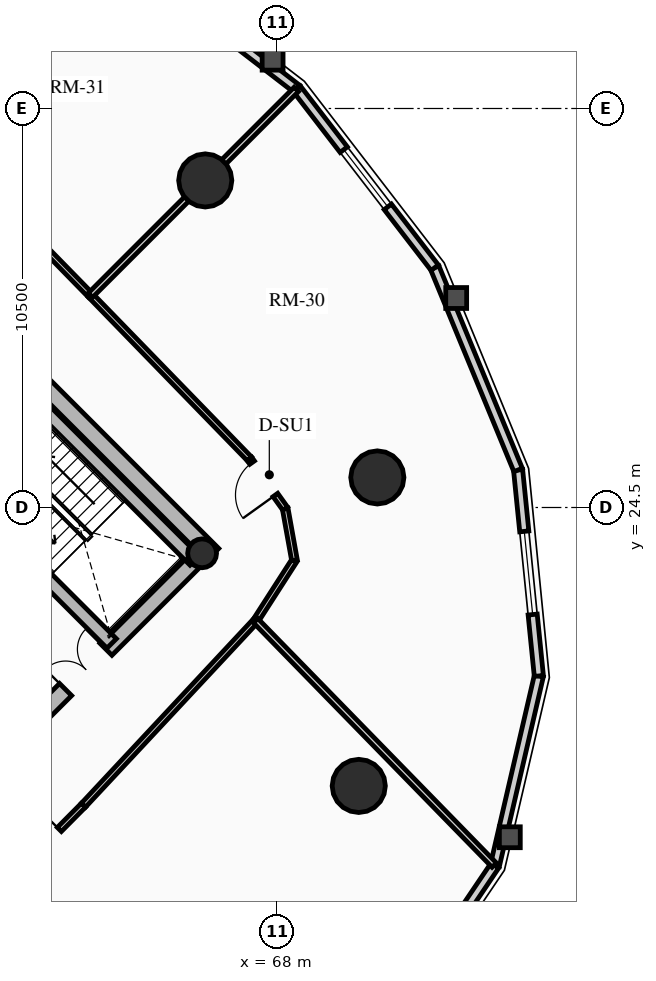
"""IFC4 building model, lengths in metres.
Left out: names, types, materials, properties, quantities, classifications, styles, units other than length and angle.
Written with IfcOpenShell. Run it as: python <this file> out.ifc"""

import sys

from ifc_helpers import new_model, si_unit, direction, frame, frame_2d, origin, origin_2d, place, context, subcontext, project, spatial, rectangle, circle, hollow_circle, extrude, source, transform, mapped, element, fill, save


model = new_model("IFC4")
c1 = context("Model", 3, precision=1e-05, world=origin(), true_north=direction((0.0, 1.0)))
c2 = subcontext(c1, "Body", "Model", "MODEL_VIEW")
j1 = project(units=[si_unit("LENGTHUNIT", "METRE"), si_unit("PLANEANGLEUNIT", "RADIAN")], contexts=[c1])
p1 = place(None, origin())
s1 = spatial("IfcSite", under=j1, at=p1, CompositionType="ELEMENT")
p2 = place(p1, origin())
s2 = spatial("IfcBuilding", under=s1, at=p2, CompositionType="ELEMENT")
p3 = place(p2, frame((0.0, 0.0, 125.44)))
s3 = spatial("IfcBuildingStorey", under=s2, at=p3, CompositionType="ELEMENT", Elevation=125.44)
p4 = place(p3, frame((66.303, 23.263, 0.0), z_axis=(0.0, 0.0, 1.0), x_axis=(-0.707106781187, 0.707106781187, 0.0)))
e1 = element("IfcWall", 1, at=p4, inside=s3, PredefinedType="SHEAR", context=c2, shape_type="SweptSolid", body=[
    extrude(rectangle(XDim=14.2, YDim=0.45, at=frame_2d((7.1, 0.0))), origin(), (0.0, 0.0, 1.0), 3.72),
])
p5 = place(p3, frame((58.578, 15.856, 0.0), z_axis=(0.0, 0.0, 1.0), x_axis=(0.707106781187, 0.707106781187, 0.0)))
e2 = element("IfcWall", 2, at=p5, inside=s3, PredefinedType="SHEAR", context=c2, shape_type="SweptSolid", body=[
    extrude(rectangle(XDim=10.7, YDim=0.45, at=frame_2d((5.35, 0.0))), origin(), (0.0, 0.0, 1.0), 3.72),
])
m1 = source(origin(), c2, "Body", "SweptSolid", [
    extrude(rectangle(XDim=1.5, YDim=2.02, at=frame_2d((0.75, 1.01))), frame((0.0, 0.235, 0.0), z_axis=(0.0, -1.0, 0.0), x_axis=(1.0, 0.0, 0.0)), (0.0, 0.0, 1.0), 0.47),
])
p6 = place(p5, frame((5.45, 0.0, 0.0)))
e3 = element("IfcOpeningElement", 3, at=p6, cuts=e2, PredefinedType="OPENING", context=c2, shape_type="MappedRepresentation", body=[
    mapped(m1, transform((0.0, 0.0, 0.0), x_axis=(1.0, 0.0, 0.0), y_axis=(0.0, 1.0, 0.0), z_axis=(0.0, 0.0, 1.0), scale=1.0)),
])
p7 = place(p3, frame((63.645, 20.922, 0.0), z_axis=(0.0, 0.0, 1.0), x_axis=(-0.707106781187, 0.707106781187, 0.0)))
e4 = element("IfcWall", 4, at=p7, inside=s3, PredefinedType="SHEAR", context=c2, shape_type="SweptSolid", body=[
    extrude(rectangle(XDim=13.75, YDim=0.35, at=frame_2d((6.875, 0.0))), origin(), (0.0, 0.0, 1.0), 3.72),
])
m2 = source(origin(), c2, "Body", "SweptSolid", [
    extrude(rectangle(XDim=1.1, YDim=2.015, at=frame_2d((0.55, 1.007))), frame((0.0, 0.185, 0.0), z_axis=(0.0, -1.0, 0.0), x_axis=(1.0, 0.0, 0.0)), (0.0, 0.0, 1.0), 0.37),
])
p8 = place(p7, frame((10.0, 0.0, 0.0)))
e5 = element("IfcOpeningElement", 5, at=p8, cuts=e4, PredefinedType="OPENING", context=c2, shape_type="MappedRepresentation", body=[
    mapped(m2, transform((0.0, 0.0, 0.0), x_axis=(1.0, 0.0, 0.0), y_axis=(0.0, 1.0, 0.0), z_axis=(0.0, 0.0, 1.0), scale=1.0)),
])
p9 = place(p7, frame((12.0, 0.0, 0.0)))
e6 = element("IfcOpeningElement", 6, at=p9, cuts=e4, PredefinedType="OPENING", context=c2, shape_type="MappedRepresentation", body=[
    mapped(m2, transform((0.0, 0.0, 0.0), x_axis=(1.0, 0.0, 0.0), y_axis=(0.0, 1.0, 0.0), z_axis=(0.0, 0.0, 1.0), scale=1.0)),
])
m3 = source(origin(), c2, "Body", "SweptSolid", [
    extrude(rectangle(XDim=1.15, YDim=2.02, at=frame_2d((0.575, 1.01))), frame((0.0, 0.185, 0.0), z_axis=(0.0, -1.0, 0.0), x_axis=(1.0, 0.0, 0.0)), (0.0, 0.0, 1.0), 0.37),
])
p10 = place(p7, frame((5.305, 0.0, 0.0)))
e7 = element("IfcOpeningElement", 7, at=p10, cuts=e4, PredefinedType="OPENING", context=c2, shape_type="MappedRepresentation", body=[
    mapped(m3, transform((0.0, 0.0, 0.0), x_axis=(1.0, 0.0, 0.0), y_axis=(0.0, 1.0, 0.0), z_axis=(0.0, 0.0, 1.0), scale=1.0)),
])
p11 = place(p3, frame((65.83, 23.107, 0.0), z_axis=(0.0, 0.0, 1.0), x_axis=(-0.707088616009, 0.707124945897, 0.0)))
e8 = element("IfcWall", 8, at=p11, inside=s3, PredefinedType="SHEAR", context=c2, shape_type="SweptSolid", body=[
    extrude(rectangle(XDim=6.72, YDim=0.35, at=frame_2d((3.36, 0.0))), origin(), (0.0, 0.0, 1.0), 3.72),
])
p12 = place(p3, frame((66.024, 23.294, 0.0), z_axis=(0.0, 0.0, 1.0), x_axis=(0.707106781187, 0.707106781187, 0.0)))
e9 = element("IfcColumn", 9, at=p12, inside=s3, PredefinedType="COLUMN", context=c2, shape_type="SweptSolid", body=[
    extrude(hollow_circle(Radius=0.38, WallThickness=0.032, at=origin_2d()), origin(), (0.0, 0.0, 1.0), 3.72),
])
for number, where, z_axis, x_axis in (
    (10, (66.107, 33.107, 0.0), (0.0, 0.0, 1.0), (1.0, 0.0, 0.0)),
    (11, (70.146, 17.173, 0.0), (0.0, 0.0, 1.0), (1.0, 0.0, 0.0)),
    (12, (70.635, 25.291, 0.0), (0.0, 0.0, 1.0), (1.0, 0.0, 0.0)),
):
    element("IfcColumn", number, at=place(p3, frame(where, z_axis=z_axis, x_axis=x_axis)), inside=s3, PredefinedType="USERDEFINED", context=c2, shape_type="SweptSolid", body=[
        extrude(circle(Radius=0.7, at=origin_2d()), origin(), (0.0, 0.0, 1.0), 3.72),
    ])
p13 = place(p3, frame((63.811, 39.145, 0.0), z_axis=(0.0, 0.0, 1.0), x_axis=(0.791982052206, -0.61054437102, 0.0)))
e13 = element("IfcWall", 13, at=p13, inside=s3, PredefinedType="SOLIDWALL", context=c2, shape_type="SweptSolid", body=[
    extrude(rectangle(XDim=5.942, YDim=0.24, at=frame_2d((2.971, 0.0))), origin(), (0.0, 0.0, 1.0), 2.949),
])
p14 = place(p3, frame((73.729, 15.08, 0.0), z_axis=(0.0, 0.0, 1.0), x_axis=(-0.559572880421, -0.828781148131, 0.0)))
e14 = element("IfcWall", 14, at=p14, inside=s3, PredefinedType="SOLIDWALL", context=c2, shape_type="SweptSolid", body=[
    extrude(rectangle(XDim=4.905, YDim=0.24, at=frame_2d((2.452, 0.0))), origin(), (0.0, 0.0, 1.0), 2.949),
])
m4 = source(origin(), c2, "Body", "SweptSolid", [
    extrude(rectangle(XDim=1.9, YDim=1.35, at=frame_2d((0.95, 0.675))), frame((0.0, 0.13, 0.0), z_axis=(0.0, -1.0, 0.0), x_axis=(1.0, 0.0, 0.0)), (0.0, 0.0, 1.0), 0.26),
])
p15 = place(p14, frame((1.502, 0.0, 0.65)))
e15 = element("IfcOpeningElement", 15, at=p15, cuts=e14, PredefinedType="OPENING", context=c2, shape_type="MappedRepresentation", body=[
    mapped(m4, transform((0.0, 0.0, 0.0), x_axis=(1.0, 0.0, 0.0), y_axis=(0.0, 1.0, 0.0), z_axis=(0.0, 0.0, 1.0), scale=1.0)),
])
p16 = place(p3, frame((74.885, 20.067, 0.0), z_axis=(0.0, 0.0, 1.0), x_axis=(-0.225834725257, -0.974165631126, 0.0)))
e16 = element("IfcWall", 16, at=p16, inside=s3, PredefinedType="SOLIDWALL", context=c2, shape_type="SweptSolid", body=[
    extrude(rectangle(XDim=5.119, YDim=0.24, at=frame_2d((2.56, 0.0))), origin(), (0.0, 0.0, 1.0), 2.949),
])
p17 = place(p3, frame((74.339, 25.487, 0.0), z_axis=(0.0, 0.0, 1.0), x_axis=(0.10015591906, -0.994971754311, 0.0)))
e17 = element("IfcWall", 17, at=p17, inside=s3, PredefinedType="SOLIDWALL", context=c2, shape_type="SweptSolid", body=[
    extrude(rectangle(XDim=5.448, YDim=0.24, at=frame_2d((2.724, 0.0))), origin(), (0.0, 0.0, 1.0), 2.949),
])
m5 = source(origin(), c2, "Body", "SweptSolid", [
    extrude(rectangle(XDim=2.2, YDim=1.35, at=frame_2d((1.1, 0.675))), frame((0.0, 0.13, 0.0), z_axis=(0.0, -1.0, 0.0), x_axis=(1.0, 0.0, 0.0)), (0.0, 0.0, 1.0), 0.26),
])
p18 = place(p17, frame((1.624, 0.0, 0.65)))
e18 = element("IfcOpeningElement", 18, at=p18, cuts=e17, PredefinedType="OPENING", context=c2, shape_type="MappedRepresentation", body=[
    mapped(m5, transform((0.0, 0.0, 0.0), x_axis=(1.0, 0.0, 0.0), y_axis=(0.0, 1.0, 0.0), z_axis=(0.0, 0.0, 1.0), scale=1.0)),
])
p19 = place(p3, frame((72.145, 30.811, 0.0), z_axis=(0.0, 0.0, 1.0), x_axis=(0.381027003055, -0.924563909604, 0.0)))
e19 = element("IfcWall", 19, at=p19, inside=s3, PredefinedType="SOLIDWALL", context=c2, shape_type="SweptSolid", body=[
    extrude(rectangle(XDim=5.758, YDim=0.24, at=frame_2d((2.879, 0.0))), origin(), (0.0, 0.0, 1.0), 2.949),
])
p20 = place(p3, frame((68.517, 35.517, 0.0), z_axis=(0.0, 0.0, 1.0), x_axis=(0.61054437102, -0.791982052206, 0.0)))
e20 = element("IfcWall", 20, at=p20, inside=s3, PredefinedType="SOLIDWALL", context=c2, shape_type="SweptSolid", body=[
    extrude(rectangle(XDim=5.942, YDim=0.24, at=frame_2d((2.971, 0.0))), origin(), (0.0, 0.0, 1.0), 2.949),
])
p21 = place(p20, frame((2.021, 0.0, 0.65)))
e21 = element("IfcOpeningElement", 21, at=p21, cuts=e20, PredefinedType="OPENING", context=c2, shape_type="MappedRepresentation", body=[
    mapped(m4, transform((0.0, 0.0, 0.0), x_axis=(1.0, 0.0, 0.0), y_axis=(0.0, 1.0, 0.0), z_axis=(0.0, 0.0, 1.0), scale=1.0)),
])
p22 = place(p3, frame((63.086, 30.086, 0.0), z_axis=(0.0, 0.0, 1.0), x_axis=(-0.699075897379, 0.715047473741, 0.0)))
e22 = element("IfcWall", 22, at=p22, inside=s3, PredefinedType="PARTITIONING", context=c2, shape_type="SweptSolid", body=[
    extrude(rectangle(XDim=6.114, YDim=0.15, at=frame_2d((3.057, 0.0))), origin(), (0.0, 0.0, 1.0), 2.995),
])
p23 = place(p3, frame((60.562, 14.31, 0.0), z_axis=(0.0, 0.0, 1.0), x_axis=(0.704566236161, 0.709638230975, 0.0)))
e23 = element("IfcWall", 23, at=p23, inside=s3, PredefinedType="PARTITIONING", context=c2, shape_type="SweptSolid", body=[
    extrude(rectangle(XDim=3.321, YDim=0.15, at=frame_2d((1.661, 0.0))), origin(), (0.0, 0.0, 1.0), 2.995),
])
m6 = source(origin(), c2, "Body", "SweptSolid", [
    extrude(rectangle(XDim=1.0, YDim=2.015, at=frame_2d((0.5, 1.007))), frame((0.0, 0.085, 0.0), z_axis=(0.0, -1.0, 0.0), x_axis=(1.0, 0.0, 0.0)), (0.0, 0.0, 1.0), 0.17),
])
p24 = place(p23, frame((1.421, 0.0, 0.0)))
e24 = element("IfcOpeningElement", 24, at=p24, cuts=e23, PredefinedType="OPENING", context=c2, shape_type="MappedRepresentation", body=[
    mapped(m6, transform((0.0, 0.0, 0.0), x_axis=(1.0, 0.0, 0.0), y_axis=(0.0, 1.0, 0.0), z_axis=(0.0, 0.0, 1.0), scale=1.0)),
])
p25 = place(p3, frame((62.903, 16.667, 0.0), z_axis=(0.0, 0.0, 1.0), x_axis=(0.682371947497, 0.731005147225, 0.0)))
e25 = element("IfcWall", 25, at=p25, inside=s3, PredefinedType="PARTITIONING", context=c2, shape_type="SweptSolid", body=[
    extrude(rectangle(XDim=6.642, YDim=0.15, at=frame_2d((3.321, 0.0))), origin(), (0.0, 0.0, 1.0), 2.995),
])
p26 = place(p3, frame((67.435, 21.521, 0.0), z_axis=(0.0, 0.0, 1.0), x_axis=(0.540777197838, 0.841165870859, 0.0)))
e26 = element("IfcWall", 26, at=p26, inside=s3, PredefinedType="PARTITIONING", context=c2, shape_type="SweptSolid", body=[
    extrude(rectangle(XDim=1.888, YDim=0.15, at=frame_2d((0.944, 0.0))), origin(), (0.0, 0.0, 1.0), 2.995),
])
p27 = place(p3, frame((68.456, 23.11, 0.0), z_axis=(0.0, 0.0, 1.0), x_axis=(-0.1772522795, 0.984165448191, 0.0)))
e27 = element("IfcWall", 27, at=p27, inside=s3, PredefinedType="PARTITIONING", context=c2, shape_type="SweptSolid", body=[
    extrude(rectangle(XDim=1.382, YDim=0.15, at=frame_2d((0.691, 0.0))), origin(), (0.0, 0.0, 1.0), 2.995),
])
p28 = place(p3, frame((68.211, 24.469, 0.0), z_axis=(0.0, 0.0, 1.0), x_axis=(-0.583012141368, 0.812463441034, 0.0)))
e28 = element("IfcWall", 28, at=p28, inside=s3, PredefinedType="PARTITIONING", context=c2, shape_type="SweptSolid", body=[
    extrude(rectangle(XDim=1.613, YDim=0.15, at=frame_2d((0.807, 0.0))), origin(), (0.0, 0.0, 1.0), 2.995),
])
m7 = source(origin(), c2, "Body", "SweptSolid", [
    extrude(rectangle(XDim=1.05, YDim=2.015, at=frame_2d((0.525, 1.007))), frame((0.0, 0.085, 0.0), z_axis=(0.0, -1.0, 0.0), x_axis=(1.0, 0.0, 0.0)), (0.0, 0.0, 1.0), 0.17),
])
p29 = place(p28, frame((0.443, 0.0, 0.0)))
e29 = element("IfcOpeningElement", 29, at=p29, cuts=e28, PredefinedType="OPENING", context=c2, shape_type="MappedRepresentation", body=[
    mapped(m7, transform((0.0, 0.0, 0.0), x_axis=(1.0, 0.0, 0.0), y_axis=(0.0, 1.0, 0.0), z_axis=(0.0, 0.0, 1.0), scale=1.0)),
])
p30 = place(p3, frame((67.27, 25.78, 0.0), z_axis=(0.0, 0.0, 1.0), x_axis=(-0.696847842907, 0.717218992942, 0.0)))
e30 = element("IfcWall", 30, at=p30, inside=s3, PredefinedType="PARTITIONING", context=c2, shape_type="SweptSolid", body=[
    extrude(rectangle(XDim=6.004, YDim=0.15, at=frame_2d((3.002, 0.0))), origin(), (0.0, 0.0, 1.0), 3.425),
])
p31 = place(p3, frame((63.086, 30.086, 0.0), z_axis=(0.0, 0.0, 1.0), x_axis=(0.707106781187, 0.707106781187, 0.0)))
e31 = element("IfcWall", 31, at=p31, inside=s3, PredefinedType="PARTITIONING", context=c2, shape_type="SweptSolid", body=[
    extrude(rectangle(XDim=7.661, YDim=0.16, at=frame_2d((3.831, 0.0))), origin(), (0.0, 0.0, 1.0), 2.949),
])
p32 = place(p3, frame((67.435, 21.521, 0.0), z_axis=(0.0, 0.0, 1.0), x_axis=(0.6983880073, -0.715719352302, 0.0)))
e32 = element("IfcWall", 32, at=p32, inside=s3, PredefinedType="PARTITIONING", context=c2, shape_type="SweptSolid", body=[
    extrude(rectangle(XDim=8.987, YDim=0.16, at=frame_2d((4.494, 0.0))), origin(), (0.0, 0.0, 1.0), 2.949),
])
m8 = source(origin(), c2, "Body", "SweptSolid", [
    extrude(rectangle(XDim=2.2, YDim=1.35, at=frame_2d((1.1, 0.675))), frame((0.0, 0.03, 0.0), z_axis=(0.0, -1.0, 0.0), x_axis=(1.0, 0.0, 0.0)), (0.0, 0.0, 1.0), 0.06),
])
p33 = place(p18, origin())
e33 = element("IfcWindow", 33, at=p33, inside=s3, PartitioningType="DOUBLE_PANEL_VERTICAL", PredefinedType="WINDOW", context=c2, shape_type="MappedRepresentation", body=[
    mapped(m8, transform((0.0, 0.0, 0.0), x_axis=(1.0, 0.0, 0.0), y_axis=(0.0, 1.0, 0.0), z_axis=(0.0, 0.0, 1.0), scale=1.0)),
])
fill(e18, e33)
m9 = source(origin(), c2, "Body", "SweptSolid", [
    extrude(rectangle(XDim=1.9, YDim=1.35, at=frame_2d((0.95, 0.675))), frame((0.0, 0.03, 0.0), z_axis=(0.0, -1.0, 0.0), x_axis=(1.0, 0.0, 0.0)), (0.0, 0.0, 1.0), 0.06),
])
p34 = place(p21, origin())
e34 = element("IfcWindow", 34, at=p34, inside=s3, PartitioningType="DOUBLE_PANEL_VERTICAL", PredefinedType="WINDOW", context=c2, shape_type="MappedRepresentation", body=[
    mapped(m9, transform((0.0, 0.0, 0.0), x_axis=(1.0, 0.0, 0.0), y_axis=(0.0, 1.0, 0.0), z_axis=(0.0, 0.0, 1.0), scale=1.0)),
])
fill(e21, e34)
m10 = source(origin(), c2, "Body", "SweptSolid", [
    extrude(rectangle(XDim=1.5, YDim=2.02, at=frame_2d((0.75, 1.01))), frame((0.0, 0.025, 0.0), z_axis=(0.0, -1.0, 0.0), x_axis=(1.0, 0.0, 0.0)), (0.0, 0.0, 1.0), 0.05),
])
p35 = place(p6, origin())
e35 = element("IfcDoor", 35, at=p35, inside=s3, OperationType="DOUBLE_DOOR_SINGLE_SWING", PredefinedType="DOOR", context=c2, shape_type="MappedRepresentation", body=[
    mapped(m10, transform((0.0, 0.0, 0.0), x_axis=(1.0, 0.0, 0.0), y_axis=(0.0, 1.0, 0.0), z_axis=(0.0, 0.0, 1.0), scale=1.0)),
])
fill(e3, e35)
m11 = source(origin(), c2, "Body", "SweptSolid", [
    extrude(rectangle(XDim=1.0, YDim=2.015, at=frame_2d((0.5, 1.007))), frame((0.0, 0.025, 0.0), z_axis=(0.0, -1.0, 0.0), x_axis=(1.0, 0.0, 0.0)), (0.0, 0.0, 1.0), 0.05),
])
p36 = place(p24, origin())
e36 = element("IfcDoor", 36, at=p36, inside=s3, OperationType="SINGLE_SWING_RIGHT", PredefinedType="DOOR", context=c2, shape_type="MappedRepresentation", body=[
    mapped(m11, transform((0.0, 0.0, 0.0), x_axis=(1.0, 0.0, 0.0), y_axis=(0.0, 1.0, 0.0), z_axis=(0.0, 0.0, 1.0), scale=1.0)),
])
fill(e24, e36)
m12 = source(origin(), c2, "Body", "SweptSolid", [
    extrude(rectangle(XDim=1.05, YDim=2.015, at=frame_2d((0.525, 1.007))), frame((0.0, 0.025, 0.0), z_axis=(0.0, -1.0, 0.0), x_axis=(1.0, 0.0, 0.0)), (0.0, 0.0, 1.0), 0.05),
])
p37 = place(p29, origin())
e37 = element("IfcDoor", 37, at=p37, inside=s3, OperationType="SINGLE_SWING_LEFT", PredefinedType="DOOR", context=c2, shape_type="MappedRepresentation", body=[
    mapped(m12, transform((0.0, 0.0, 0.0), x_axis=(1.0, 0.0, 0.0), y_axis=(0.0, 1.0, 0.0), z_axis=(0.0, 0.0, 1.0), scale=1.0)),
])
fill(e29, e37)
save(model, sys.argv[1])
